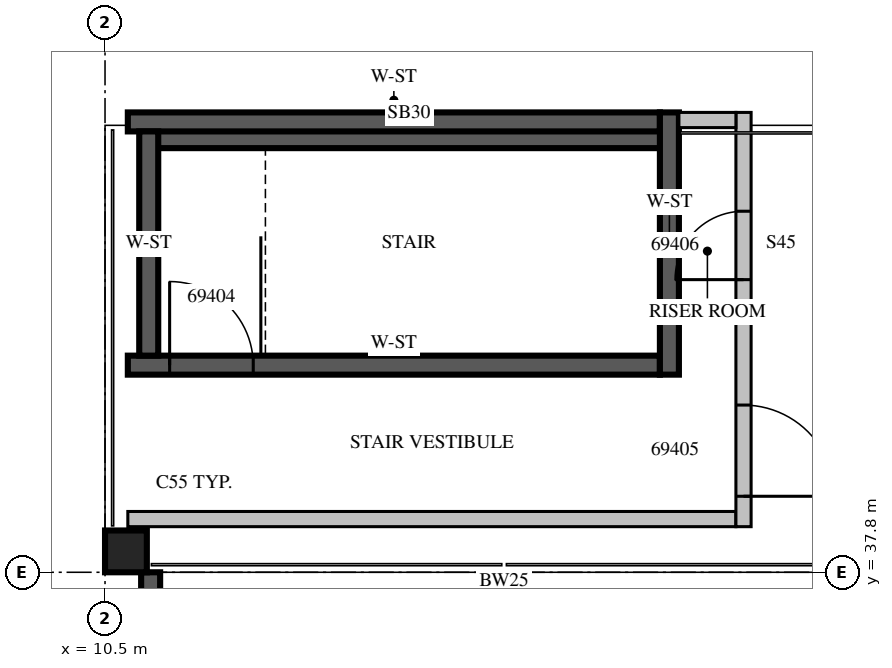
"""IFC4 building model, lengths in metres.
Left out: names, types, materials, properties, quantities, classifications, styles, units other than length and angle.
Written with IfcOpenShell. Run it as: python <this file> out.ifc"""

import sys

from ifc_helpers import new_model, si_unit, direction, frame, frame_2d, origin, origin_2d, place, context, subcontext, project, spatial, rectangle, extrude, source, transform, mapped, element, fill, save


model = new_model("IFC4")
c1 = context("Model", 3, precision=1e-05, world=origin(), true_north=direction((0.0, 1.0)))
c2 = subcontext(c1, "Body", "Model", "MODEL_VIEW")
j1 = project(units=[si_unit("LENGTHUNIT", "METRE"), si_unit("PLANEANGLEUNIT", "RADIAN")], contexts=[c1])
p1 = place(None, origin())
s1 = spatial("IfcSite", under=j1, at=p1, CompositionType="ELEMENT")
p2 = place(p1, origin())
s2 = spatial("IfcBuilding", under=s1, at=p2, CompositionType="ELEMENT")
p3 = place(p2, frame((0.0, 0.0, 380.5)))
s3 = spatial("IfcBuildingStorey", under=s2, at=p3, CompositionType="ELEMENT", Elevation=380.5)
m1 = source(origin(), c2, "Body", "SweptSolid", [
    extrude(rectangle(XDim=0.55, YDim=0.55, at=origin_2d()), origin(), (0.0, 0.0, 1.0), 4.0),
])
p4 = place(p3, frame((10.775, 38.075, 0.0), z_axis=(0.0, 0.0, 1.0), x_axis=(1.0, 0.0, 0.0)))
e1 = element("IfcColumn", 1, at=p4, inside=s3, PredefinedType="COLUMN", context=c2, shape_type="MappedRepresentation", body=[
    mapped(m1, transform((0.0, 0.0, 0.0), scale=1.0)),
])
m2 = source(origin(), c2, "Body", "SweptSolid", [
    extrude(rectangle(XDim=2.808, YDim=0.25, at=frame_2d((1.404, 0.0))), origin(), (0.0, 0.0, 1.0), 3.55),
])
p5 = place(p3, frame((11.1, 37.8, 0.0), z_axis=(0.0, 0.0, 1.0), x_axis=(0.0, -1.0, 0.0)))
e2 = element("IfcWall", 2, at=p5, inside=s3, PredefinedType="SOLIDWALL", context=c2, shape_type="MappedRepresentation", body=[
    mapped(m2, transform((0.0, 0.0, 0.0), scale=1.0)),
])
p6 = place(p3, frame((18.0, 43.53, 0.0), z_axis=(0.0, 0.0, 1.0), x_axis=(-1.0, 0.0, 0.0)))
e3 = element("IfcWall", 3, at=p6, inside=s3, PredefinedType="SOLIDWALL", context=c2, shape_type="SweptSolid", body=[
    extrude(rectangle(XDim=7.0, YDim=0.3, at=frame_2d((3.5, 0.0))), origin(), (0.0, 0.0, 1.0), 3.55),
])
m3 = source(origin(), c2, "Body", "SweptSolid", [
    extrude(rectangle(XDim=7.0, YDim=0.25, at=frame_2d((3.5, 0.0))), origin(), (0.0, 0.0, 1.0), 3.55),
])
p7 = place(p3, frame((10.8, 40.525, 0.0), z_axis=(0.0, 0.0, 1.0), x_axis=(1.0, 0.0, 0.0)))
e4 = element("IfcWall", 4, at=p7, inside=s3, PredefinedType="SOLIDWALL", context=c2, shape_type="MappedRepresentation", body=[
    mapped(m3, transform((0.0, 0.0, 0.0), scale=1.0)),
])
m4 = source(origin(), c2, "Body", "SweptSolid", [
    extrude(rectangle(XDim=1.1, YDim=2.1, at=frame_2d((0.55, 1.05))), frame((0.0, 0.135, 0.0), z_axis=(0.0, -1.0, 0.0), x_axis=(1.0, 0.0, 0.0)), (0.0, 0.0, 1.0), 0.27),
])
p8 = place(p7, frame((0.55, 0.0, 0.0)))
e5 = element("IfcOpeningElement", 5, at=p8, cuts=e4, PredefinedType="OPENING", context=c2, shape_type="MappedRepresentation", body=[
    mapped(m4, transform((0.0, 0.0, 0.0), scale=1.0)),
])
p9 = place(p3, frame((10.8, 43.725, 0.0), z_axis=(0.0, 0.0, 1.0), x_axis=(1.0, 0.0, 0.0)))
e6 = element("IfcWall", 6, at=p9, inside=s3, PredefinedType="SOLIDWALL", context=c2, shape_type="MappedRepresentation", body=[
    mapped(m3, transform((0.0, 0.0, 0.0), scale=1.0)),
])
m5 = source(origin(), c2, "Body", "SweptSolid", [
    extrude(rectangle(XDim=3.45, YDim=0.25, at=frame_2d((1.725, 0.0))), origin(), (0.0, 0.0, 1.0), 3.55),
])
p10 = place(p3, frame((17.925, 40.4, 0.0), z_axis=(0.0, 0.0, 1.0), x_axis=(0.0, 1.0, 0.0)))
e7 = element("IfcWall", 7, at=p10, inside=s3, PredefinedType="SOLIDWALL", context=c2, shape_type="MappedRepresentation", body=[
    mapped(m5, transform((0.0, 0.0, 0.0), scale=1.0)),
])
m6 = source(origin(), c2, "Body", "SweptSolid", [
    extrude(rectangle(XDim=2.95, YDim=0.25, at=frame_2d((1.475, 0.0))), origin(), (0.0, 0.0, 1.0), 3.55),
])
p11 = place(p3, frame((11.075, 40.65, 0.0), z_axis=(0.0, 0.0, 1.0), x_axis=(0.0, 1.0, 0.0)))
e8 = element("IfcWall", 8, at=p11, inside=s3, PredefinedType="SOLIDWALL", context=c2, shape_type="MappedRepresentation", body=[
    mapped(m6, transform((0.0, 0.0, 0.0), scale=1.0)),
])
m7 = source(origin(), c2, "Body", "SweptSolid", [
    extrude(rectangle(XDim=8.0, YDim=0.2, at=frame_2d((4.0, 0.0))), origin(), (0.0, 0.0, 1.0), 3.55),
])
p12 = place(p3, frame((10.8, 38.5, 0.0), z_axis=(0.0, 0.0, 1.0), x_axis=(1.0, 0.0, 0.0)))
e9 = element("IfcWall", 9, at=p12, inside=s3, PredefinedType="PARTITIONING", context=c2, shape_type="MappedRepresentation", body=[
    mapped(m7, transform((0.0, 0.0, 0.0), scale=1.0)),
])
m8 = source(origin(), c2, "Body", "SweptSolid", [
    extrude(rectangle(XDim=5.45, YDim=0.2, at=frame_2d((2.725, 0.0))), origin(), (0.0, 0.0, 1.0), 3.55),
])
p13 = place(p3, frame((18.9, 38.4, 0.0), z_axis=(0.0, 0.0, 1.0), x_axis=(0.0, 1.0, 0.0)))
e10 = element("IfcWall", 10, at=p13, inside=s3, PredefinedType="PARTITIONING", context=c2, shape_type="MappedRepresentation", body=[
    mapped(m8, transform((0.0, 0.0, 0.0), scale=1.0)),
])
m9 = source(origin(), c2, "Body", "SweptSolid", [
    extrude(rectangle(XDim=1.2, YDim=2.1, at=frame_2d((0.6, 1.05))), frame((0.0, 0.11, 0.0), z_axis=(0.0, -1.0, 0.0), x_axis=(1.0, 0.0, 0.0)), (0.0, 0.0, 1.0), 0.22),
])
p14 = place(p13, frame((0.4, 0.0, 0.0)))
e11 = element("IfcOpeningElement", 11, at=p14, cuts=e10, PredefinedType="OPENING", context=c2, shape_type="MappedRepresentation", body=[
    mapped(m9, transform((0.0, 0.0, 0.0), scale=1.0)),
])
m10 = source(origin(), c2, "Body", "SweptSolid", [
    extrude(rectangle(XDim=0.9, YDim=2.1, at=frame_2d((0.45, 1.05))), frame((0.0, 0.11, 0.0), z_axis=(0.0, -1.0, 0.0), x_axis=(1.0, 0.0, 0.0)), (0.0, 0.0, 1.0), 0.22),
])
p15 = place(p13, frame((3.25, 0.0, 0.0)))
e12 = element("IfcOpeningElement", 12, at=p15, cuts=e10, PredefinedType="OPENING", context=c2, shape_type="MappedRepresentation", body=[
    mapped(m10, transform((0.0, 0.0, 0.0), scale=1.0)),
])
m11 = source(origin(), c2, "Body", "SweptSolid", [
    extrude(rectangle(XDim=0.75, YDim=0.2, at=frame_2d((0.375, 0.0))), origin(), (0.0, 0.0, 1.0), 3.55),
])
p16 = place(p3, frame((18.05, 43.75, 0.0), z_axis=(0.0, 0.0, 1.0), x_axis=(1.0, 0.0, 0.0)))
e13 = element("IfcWall", 13, at=p16, inside=s3, PredefinedType="PARTITIONING", context=c2, shape_type="MappedRepresentation", body=[
    mapped(m11, transform((0.0, 0.0, 0.0), scale=1.0)),
])
m12 = source(origin(), c2, "Body", "SweptSolid", [
    extrude(rectangle(XDim=1.1, YDim=2.1, at=frame_2d((0.55, 1.05))), frame((0.0, 0.025, 0.0), z_axis=(0.0, -1.0, 0.0), x_axis=(1.0, 0.0, 0.0)), (0.0, 0.0, 1.0), 0.05),
])
p17 = place(p8, origin())
e14 = element("IfcDoor", 14, at=p17, inside=s3, OperationType="SINGLE_SWING_LEFT", PredefinedType="DOOR", context=c2, shape_type="MappedRepresentation", body=[
    mapped(m12, transform((0.0, 0.0, 0.0), scale=1.0)),
])
fill(e5, e14)
m13 = source(origin(), c2, "Body", "SweptSolid", [
    extrude(rectangle(XDim=1.2, YDim=2.1, at=frame_2d((0.6, 1.05))), frame((0.0, 0.025, 0.0), z_axis=(0.0, -1.0, 0.0), x_axis=(1.0, 0.0, 0.0)), (0.0, 0.0, 1.0), 0.05),
])
p18 = place(p14, origin())
e15 = element("IfcDoor", 15, at=p18, inside=s3, OperationType="SINGLE_SWING_RIGHT", PredefinedType="DOOR", context=c2, shape_type="MappedRepresentation", body=[
    mapped(m13, transform((0.0, 0.0, 0.0), scale=1.0)),
])
fill(e11, e15)
m14 = source(origin(), c2, "Body", "SweptSolid", [
    extrude(rectangle(XDim=0.9, YDim=2.1, at=frame_2d((0.45, 1.05))), frame((0.0, 0.025, 0.0), z_axis=(0.0, -1.0, 0.0), x_axis=(1.0, 0.0, 0.0)), (0.0, 0.0, 1.0), 0.05),
])
p19 = place(p15, origin())
e16 = element("IfcDoor", 16, at=p19, inside=s3, OperationType="SINGLE_SWING_LEFT", PredefinedType="DOOR", context=c2, shape_type="MappedRepresentation", body=[
    mapped(m14, transform((0.0, 0.0, 0.0), scale=1.0)),
])
fill(e12, e16)
save(model, sys.argv[1])
